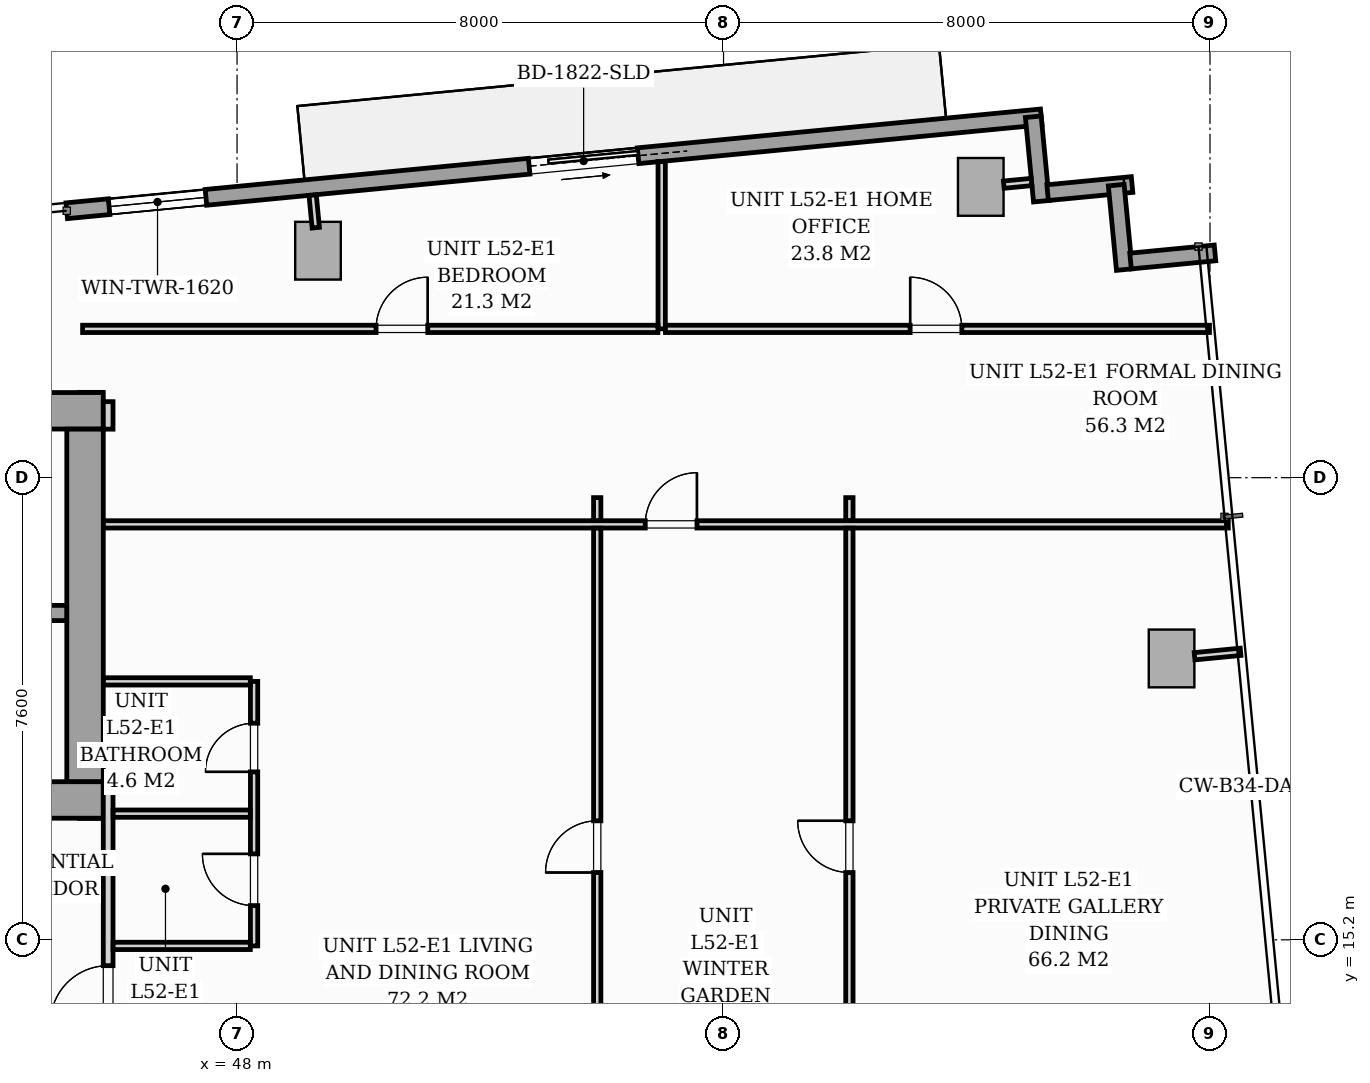
"""IFC4 building model, lengths in metres.
Left out: names, types, materials, properties, quantities, classifications, styles, units other than length and angle.
Written with IfcOpenShell. Run it as: python <this file> out.ifc"""

import sys

from ifc_helpers import new_model, si_unit, direction, frame, frame_2d, origin, origin_2d, place, context, subcontext, project, spatial, rectangle, i_section, extrude, source, transform, mapped, element, fill, save


model = new_model("IFC4")
c1 = context("Model", 3, precision=1e-05, world=origin(), true_north=direction((0.0, 1.0)))
c2 = subcontext(c1, "Body", "Model", "MODEL_VIEW")
j1 = project(units=[si_unit("LENGTHUNIT", "METRE"), si_unit("PLANEANGLEUNIT", "RADIAN")], contexts=[c1])
p1 = place(None, origin())
s1 = spatial("IfcSite", under=j1, at=p1, CompositionType="ELEMENT")
p2 = place(p1, origin())
s2 = spatial("IfcBuilding", under=s1, at=p2, CompositionType="ELEMENT")
p3 = place(p2, frame((0.0, 0.0, 182.6)))
s3 = spatial("IfcBuildingStorey", under=s2, at=p3, CompositionType="ELEMENT", Elevation=182.6)
m1 = source(origin(), c2, "Body", "SweptSolid", [
    extrude(i_section(OverallWidth=0.416, OverallDepth=0.446, WebThickness=0.039, FlangeThickness=0.063, FilletRadius=0.018, at=origin_2d()), origin(), (0.0, 0.0, 1.0), 3.196),
])
for number, where, z_axis, x_axis in (
    (1, (45.6, 17.4, 0.002), (0.0, 0.0, 1.0), (1.0, 0.0, 0.0)),
    (2, (45.6, 24.0, 0.002), (0.0, 0.0, 1.0), (1.0, 0.0, 0.0)),
):
    element("IfcColumn", number, at=place(p3, frame(where, z_axis=z_axis, x_axis=x_axis)), inside=s3, PredefinedType="PILASTER", context=c2, shape_type="MappedRepresentation", body=[
        mapped(m1, transform((0.0, 0.0, 0.0), scale=1.0)),
    ])
m2 = source(origin(), c2, "Body", "SweptSolid", [
    extrude(rectangle(XDim=0.75, YDim=0.95, at=origin_2d()), origin(), (0.0, 0.0, 1.0), 3.196),
])
for number, where, z_axis, x_axis in (
    (3, (49.331, 26.533, 0.002), (0.0, 0.0, 1.0), (0.995, 0.096, 0.0)),
    (4, (60.23, 27.582, 0.002), (0.0, 0.0, 1.0), (0.995, 0.096, 0.0)),
    (5, (63.368, 19.827, 0.002), (0.0, 0.0, 1.0), (0.995, 0.096, 0.0)),
):
    element("IfcColumn", number, at=place(p3, frame(where, z_axis=z_axis, x_axis=x_axis)), inside=s3, PredefinedType="COLUMN", context=c2, shape_type="MappedRepresentation", body=[
        mapped(m2, transform((0.0, 0.0, 0.0), scale=1.0)),
    ])
p4 = place(p3, frame((45.199, 27.19, 0.0), z_axis=(0.0, 0.0, 1.0), x_axis=(0.995397074604, 0.095836652014, 0.0)))
e6 = element("IfcWall", 6, at=p4, inside=s3, PredefinedType="STANDARD", context=c2, shape_type="SweptSolid", body=[
    extrude(rectangle(XDim=16.1, YDim=0.26, at=frame_2d((8.05, 0.0))), origin(), (0.0, 0.0, 1.0), 2.94),
])
p5 = place(p4, frame((7.64, 0.0, 0.0)))
e7 = element("IfcOpeningElement", 7, at=p5, cuts=e6, PredefinedType="OPENING", context=c2, shape_type="SweptSolid", body=[
    extrude(rectangle(XDim=1.8, YDim=2.06, at=frame_2d((0.9, 1.03))), frame((0.0, 0.14, 0.0), z_axis=(0.0, -1.0, 0.0), x_axis=(1.0, 0.0, 0.0)), (0.0, 0.0, 1.0), 0.28),
])
p6 = place(p4, frame((0.7, 0.0, 0.65)))
e8 = element("IfcOpeningElement", 8, at=p6, cuts=e6, PredefinedType="OPENING", context=c2, shape_type="SweptSolid", body=[
    extrude(rectangle(XDim=1.6, YDim=1.5, at=frame_2d((0.8, 0.75))), frame((0.0, 0.14, 0.0), z_axis=(0.0, -1.0, 0.0), x_axis=(1.0, 0.0, 0.0)), (0.0, 0.0, 1.0), 0.28),
])
p7 = place(p3, frame((61.094, 28.735, 0.0), z_axis=(0.0, 0.0, 1.0), x_axis=(0.095742423056, -0.99540614245, 0.0)))
e9 = element("IfcWall", 9, at=p7, inside=s3, PredefinedType="STANDARD", context=c2, shape_type="SweptSolid", body=[
    extrude(rectangle(XDim=1.395, YDim=0.26, at=frame_2d((0.697, 0.0))), origin(), (0.0, 0.0, 1.0), 2.94),
])
p8 = place(p3, frame((61.33, 27.487, 0.0), z_axis=(0.0, 0.0, 1.0), x_axis=(0.995391056452, 0.09589913835, 0.0)))
e10 = element("IfcWall", 10, at=p8, inside=s3, PredefinedType="STANDARD", context=c2, shape_type="SweptSolid", body=[
    extrude(rectangle(XDim=1.395, YDim=0.26, at=frame_2d((0.698, 0.0))), origin(), (0.0, 0.0, 1.0), 2.94),
])
for number, where, z_axis, x_axis in (
    (11, (62.458, 27.611, 0.0), (0.0, 0.0, 1.0), (0.096, -0.995, 0.0)),
    (12, (62.694, 26.363, 0.0), (0.0, 0.0, 1.0), (0.995, 0.096, 0.0)),
):
    element("IfcWall", number, at=place(p3, frame(where, z_axis=z_axis, x_axis=x_axis)), inside=s3, PredefinedType="STANDARD", context=c2, shape_type="SweptSolid", body=[
        extrude(rectangle(XDim=1.395, YDim=0.26, at=frame_2d((0.697, 0.0))), origin(), (0.0, 0.0, 1.0), 2.94),
    ])
p9 = place(p3, frame((26.2, 17.5, 0.0), z_axis=(0.0, 0.0, 1.0), x_axis=(1.0, 0.0, 0.0)))
e13 = element("IfcWall", 13, at=p9, inside=s3, PredefinedType="SHEAR", context=c2, shape_type="SweptSolid", body=[
    extrude(rectangle(XDim=19.6, YDim=0.6, at=frame_2d((9.8, 0.0))), origin(), (0.0, 0.0, 1.0), 3.2),
])
p10 = place(p9, frame((0.95, 0.0, 0.0)))
e14 = element("IfcOpeningElement", 14, at=p10, cuts=e13, PredefinedType="OPENING", context=c2, shape_type="SweptSolid", body=[
    extrude(rectangle(XDim=0.95, YDim=2.06, at=frame_2d((0.475, 1.03))), frame((0.0, 0.31, 0.0), z_axis=(0.0, -1.0, 0.0), x_axis=(1.0, 0.0, 0.0)), (0.0, 0.0, 1.0), 0.62),
])
p11 = place(p9, frame((9.38, 0.0, 0.0)))
e15 = element("IfcOpeningElement", 15, at=p11, cuts=e13, PredefinedType="OPENING", context=c2, shape_type="SweptSolid", body=[
    extrude(rectangle(XDim=0.85, YDim=2.0, at=frame_2d((0.425, 1.0))), frame((0.0, 0.31, 0.0), z_axis=(0.0, -1.0, 0.0), x_axis=(1.0, 0.0, 0.0)), (0.0, 0.0, 1.0), 0.62),
])
p12 = place(p9, frame((17.55, 0.0, 0.0)))
e16 = element("IfcOpeningElement", 16, at=p12, cuts=e13, PredefinedType="OPENING", context=c2, shape_type="SweptSolid", body=[
    extrude(rectangle(XDim=0.95, YDim=2.06, at=frame_2d((0.475, 1.03))), frame((0.0, 0.31, 0.0), z_axis=(0.0, -1.0, 0.0), x_axis=(1.0, 0.0, 0.0)), (0.0, 0.0, 1.0), 0.62),
])
p13 = place(p3, frame((26.2, 23.9, 0.0), z_axis=(0.0, 0.0, 1.0), x_axis=(1.0, 0.0, 0.0)))
e17 = element("IfcWall", 17, at=p13, inside=s3, PredefinedType="SHEAR", context=c2, shape_type="SweptSolid", body=[
    extrude(rectangle(XDim=19.6, YDim=0.6, at=frame_2d((9.8, 0.0))), origin(), (0.0, 0.0, 1.0), 3.2),
])
p14 = place(p3, frame((45.5, 17.802, 0.0), z_axis=(0.0, 0.0, 1.0), x_axis=(0.0, 1.0, 0.0)))
e18 = element("IfcWall", 18, at=p14, inside=s3, PredefinedType="SHEAR", context=c2, shape_type="SweptSolid", body=[
    extrude(rectangle(XDim=5.796, YDim=0.6, at=frame_2d((2.898, 0.0))), origin(), (0.0, 0.0, 1.0), 3.2),
])
p15 = place(p3, frame((37.05, 20.575, 0.0), z_axis=(0.0, 0.0, 1.0), x_axis=(1.0, 0.0, 0.0)))
e19 = element("IfcWall", 19, at=p15, inside=s3, PredefinedType="SOLIDWALL", context=c2, shape_type="SweptSolid", body=[
    extrude(rectangle(XDim=8.148, YDim=0.25, at=frame_2d((4.074, 0.0))), origin(), (0.0, 0.0, 1.0), 3.2),
])
p16 = place(p15, frame((6.6, 0.0, 0.0)))
e20 = element("IfcOpeningElement", 20, at=p16, cuts=e19, PredefinedType="OPENING", context=c2, shape_type="SweptSolid", body=[
    extrude(rectangle(XDim=0.95, YDim=2.06, at=frame_2d((0.475, 1.03))), frame((0.0, 0.135, 0.0), z_axis=(0.0, -1.0, 0.0), x_axis=(1.0, 0.0, 0.0)), (0.0, 0.0, 1.0), 0.27),
])
p17 = place(p3, frame((45.88, 13.332, 0.0), z_axis=(0.0, 0.0, 1.0), x_axis=(0.0, 1.0, 0.0)))
e21 = element("IfcWall", 21, at=p17, inside=s3, PredefinedType="PARTITIONING", context=c2, shape_type="SweptSolid", body=[
    extrude(rectangle(XDim=4.47, YDim=0.16, at=frame_2d((2.235, 0.0))), origin(), (0.0, 0.0, 1.0), 2.94),
])
p18 = place(p17, frame((0.493, 0.0, 0.0)))
e22 = element("IfcOpeningElement", 22, at=p18, cuts=e21, PredefinedType="OPENING", context=c2, shape_type="SweptSolid", body=[
    extrude(rectangle(XDim=0.95, YDim=2.06, at=frame_2d((0.475, 1.03))), frame((0.0, 0.09, 0.0), z_axis=(0.0, -1.0, 0.0), x_axis=(1.0, 0.0, 0.0)), (0.0, 0.0, 1.0), 0.18),
])
p19 = place(p3, frame((45.88, 23.598, 0.0), z_axis=(0.0, 0.0, 1.0), x_axis=(0.0, 1.0, 0.0)))
e23 = element("IfcWall", 23, at=p19, inside=s3, PredefinedType="PARTITIONING", context=c2, shape_type="SweptSolid", body=[
    extrude(rectangle(XDim=0.452, YDim=0.16, at=frame_2d((0.226, 0.0))), origin(), (0.0, 0.0, 1.0), 2.94),
])
p20 = place(p3, frame((48.28, 15.1, 0.0), z_axis=(0.0, 0.0, 1.0), x_axis=(0.0, 1.0, 0.0)))
e24 = element("IfcWall", 24, at=p20, inside=s3, PredefinedType="PARTITIONING", context=c2, shape_type="SweptSolid", body=[
    extrude(rectangle(XDim=4.35, YDim=0.12, at=frame_2d((2.175, 0.0))), origin(), (0.0, 0.0, 1.0), 2.94),
])
p21 = place(p20, frame((0.663, 0.0, 0.0)))
e25 = element("IfcOpeningElement", 25, at=p21, cuts=e24, PredefinedType="OPENING", context=c2, shape_type="SweptSolid", body=[
    extrude(rectangle(XDim=0.85, YDim=2.05, at=frame_2d((0.425, 1.025))), frame((0.0, 0.07, 0.0), z_axis=(0.0, -1.0, 0.0), x_axis=(1.0, 0.0, 0.0)), (0.0, 0.0, 1.0), 0.14),
])
p22 = place(p20, frame((2.862, 0.0, 0.0)))
e26 = element("IfcOpeningElement", 26, at=p22, cuts=e24, PredefinedType="OPENING", context=c2, shape_type="SweptSolid", body=[
    extrude(rectangle(XDim=0.8, YDim=2.02, at=frame_2d((0.4, 1.01))), frame((0.0, 0.07, 0.0), z_axis=(0.0, -1.0, 0.0), x_axis=(1.0, 0.0, 0.0)), (0.0, 0.0, 1.0), 0.14),
])
for number, where, z_axis, x_axis in (
    (27, (45.962, 17.275, 0.0), (0.0, 0.0, 1.0), (1.0, 0.0, 0.0)),
    (28, (45.962, 15.1, 0.0), (0.0, 0.0, 1.0), (1.0, 0.0, 0.0)),
):
    element("IfcWall", number, at=place(p3, frame(where, z_axis=z_axis, x_axis=x_axis)), inside=s3, PredefinedType="PARTITIONING", context=c2, shape_type="SweptSolid", body=[
        extrude(rectangle(XDim=2.256, YDim=0.12, at=frame_2d((1.128, 0.0))), origin(), (0.0, 0.0, 1.0), 2.94),
    ])
p23 = place(p3, frame((45.802, 19.45, 0.0), z_axis=(0.0, 0.0, 1.0), x_axis=(1.0, 0.0, 0.0)))
e29 = element("IfcWall", 29, at=p23, inside=s3, PredefinedType="PARTITIONING", context=c2, shape_type="SweptSolid", body=[
    extrude(rectangle(XDim=2.416, YDim=0.12, at=frame_2d((1.208, 0.0))), origin(), (0.0, 0.0, 1.0), 2.94),
])
p24 = place(p3, frame((54.983, 25.247, 0.0), z_axis=(0.0, 0.0, 1.0), x_axis=(0.0, 1.0, 0.0)))
e30 = element("IfcWall", 30, at=p24, inside=s3, PredefinedType="PARTITIONING", context=c2, shape_type="SweptSolid", body=[
    extrude(rectangle(XDim=2.752, YDim=0.12, at=frame_2d((1.376, 0.0))), origin(), (0.0, 0.0, 1.0), 2.94),
])
p25 = place(p3, frame((45.46, 25.247, 0.0), z_axis=(0.0, 0.0, 1.0), x_axis=(1.0, 0.0, 0.0)))
e31 = element("IfcWall", 31, at=p25, inside=s3, PredefinedType="PARTITIONING", context=c2, shape_type="SweptSolid", body=[
    extrude(rectangle(XDim=9.461, YDim=0.12, at=frame_2d((4.73, 0.0))), origin(), (0.0, 0.0, 1.0), 2.94),
])
p26 = place(p25, frame((4.826, 0.0, 0.0)))
e32 = element("IfcOpeningElement", 32, at=p26, cuts=e31, PredefinedType="OPENING", context=c2, shape_type="SweptSolid", body=[
    extrude(rectangle(XDim=0.85, YDim=2.05, at=frame_2d((0.425, 1.025))), frame((0.0, 0.07, 0.0), z_axis=(0.0, -1.0, 0.0), x_axis=(1.0, 0.0, 0.0)), (0.0, 0.0, 1.0), 0.14),
])
p27 = place(p3, frame((55.045, 25.247, 0.0), z_axis=(0.0, 0.0, 1.0), x_axis=(1.0, 0.0, 0.0)))
e33 = element("IfcWall", 33, at=p27, inside=s3, PredefinedType="PARTITIONING", context=c2, shape_type="SweptSolid", body=[
    extrude(rectangle(XDim=8.947, YDim=0.12, at=frame_2d((4.473, 0.0))), origin(), (0.0, 0.0, 1.0), 2.94),
])
p28 = place(p27, frame((4.024, 0.0, 0.0)))
e34 = element("IfcOpeningElement", 34, at=p28, cuts=e33, PredefinedType="OPENING", context=c2, shape_type="SweptSolid", body=[
    extrude(rectangle(XDim=0.85, YDim=2.05, at=frame_2d((0.425, 1.025))), frame((0.0, 0.07, 0.0), z_axis=(0.0, -1.0, 0.0), x_axis=(1.0, 0.0, 0.0)), (0.0, 0.0, 1.0), 0.14),
])
p29 = place(p3, frame((45.802, 22.032, 0.0), z_axis=(0.0, 0.0, 1.0), x_axis=(1.0, 0.0, 0.0)))
e35 = element("IfcWall", 35, at=p29, inside=s3, PredefinedType="PARTITIONING", context=c2, shape_type="SweptSolid", body=[
    extrude(rectangle(XDim=18.499, YDim=0.12, at=frame_2d((9.25, 0.0))), origin(), (0.0, 0.0, 1.0), 2.94),
])
p30 = place(p29, frame((8.911, 0.0, 0.0)))
e36 = element("IfcOpeningElement", 36, at=p30, cuts=e35, PredefinedType="OPENING", context=c2, shape_type="SweptSolid", body=[
    extrude(rectangle(XDim=0.85, YDim=2.05, at=frame_2d((0.425, 1.025))), frame((0.0, 0.07, 0.0), z_axis=(0.0, -1.0, 0.0), x_axis=(1.0, 0.0, 0.0)), (0.0, 0.0, 1.0), 0.14),
])
p31 = place(p3, frame((58.07, 11.495, 0.0), z_axis=(0.0, 0.0, 1.0), x_axis=(0.0, 1.0, 0.0)))
e37 = element("IfcWall", 37, at=p31, inside=s3, PredefinedType="PARTITIONING", context=c2, shape_type="SweptSolid", body=[
    extrude(rectangle(XDim=10.475, YDim=0.12, at=frame_2d((5.237, 0.0))), origin(), (0.0, 0.0, 1.0), 2.94),
])
p32 = place(p31, frame((4.812, 0.0, 0.0)))
e38 = element("IfcOpeningElement", 38, at=p32, cuts=e37, PredefinedType="OPENING", context=c2, shape_type="SweptSolid", body=[
    extrude(rectangle(XDim=0.85, YDim=2.05, at=frame_2d((0.425, 1.025))), frame((0.0, 0.07, 0.0), z_axis=(0.0, -1.0, 0.0), x_axis=(1.0, 0.0, 0.0)), (0.0, 0.0, 1.0), 0.14),
])
p33 = place(p3, frame((58.07, 22.094, 0.0), z_axis=(0.0, 0.0, 1.0), x_axis=(0.0, 1.0, 0.0)))
e39 = element("IfcWall", 39, at=p33, inside=s3, PredefinedType="PARTITIONING", context=c2, shape_type="SweptSolid", body=[
    extrude(rectangle(XDim=0.378, YDim=0.12, at=frame_2d((0.189, 0.0))), origin(), (0.0, 0.0, 1.0), 2.94),
])
p34 = place(p3, frame((53.923, 11.495, 0.0), z_axis=(0.0, 0.0, 1.0), x_axis=(0.0, 1.0, 0.0)))
e40 = element("IfcWall", 40, at=p34, inside=s3, PredefinedType="PARTITIONING", context=c2, shape_type="SweptSolid", body=[
    extrude(rectangle(XDim=10.475, YDim=0.12, at=frame_2d((5.237, 0.0))), origin(), (0.0, 0.0, 1.0), 2.94),
])
p35 = place(p34, frame((4.812, 0.0, 0.0)))
e41 = element("IfcOpeningElement", 41, at=p35, cuts=e40, PredefinedType="OPENING", context=c2, shape_type="SweptSolid", body=[
    extrude(rectangle(XDim=0.85, YDim=2.05, at=frame_2d((0.425, 1.025))), frame((0.0, 0.07, 0.0), z_axis=(0.0, -1.0, 0.0), x_axis=(1.0, 0.0, 0.0)), (0.0, 0.0, 1.0), 0.14),
])
p36 = place(p3, frame((53.923, 22.094, 0.0), z_axis=(0.0, 0.0, 1.0), x_axis=(0.0, 1.0, 0.0)))
e42 = element("IfcWall", 42, at=p36, inside=s3, PredefinedType="PARTITIONING", context=c2, shape_type="SweptSolid", body=[
    extrude(rectangle(XDim=0.378, YDim=0.12, at=frame_2d((0.189, 0.0))), origin(), (0.0, 0.0, 1.0), 2.94),
])
p37 = place(p3, frame((49.294, 26.911, 0.0), z_axis=(0.0, 0.0, 1.0), x_axis=(-0.095772948675, 0.995403205893, 0.0)))
e43 = element("IfcWall", 43, at=p37, inside=s3, PredefinedType="PARTITIONING", context=c2, shape_type="SweptSolid", body=[
    extrude(rectangle(XDim=0.538, YDim=0.12, at=frame_2d((0.269, 0.0))), origin(), (0.0, 0.0, 1.0), 2.94),
])
p38 = place(p3, frame((60.609, 27.618, 0.0), z_axis=(0.0, 0.0, 1.0), x_axis=(0.995384576284, 0.09596637586, 0.0)))
e44 = element("IfcWall", 44, at=p38, inside=s3, PredefinedType="PARTITIONING", context=c2, shape_type="SweptSolid", body=[
    extrude(rectangle(XDim=0.458, YDim=0.12, at=frame_2d((0.229, 0.0))), origin(), (0.0, 0.0, 1.0), 2.94),
])
p39 = place(p3, frame((63.747, 19.864, 0.0), z_axis=(0.0, 0.0, 1.0), x_axis=(0.995405496295, 0.095749140702, 0.0)))
e45 = element("IfcWall", 45, at=p39, inside=s3, PredefinedType="PARTITIONING", context=c2, shape_type="SweptSolid", body=[
    extrude(rectangle(XDim=0.76, YDim=0.12, at=frame_2d((0.38, 0.0))), origin(), (0.0, 0.0, 1.0), 2.94),
])
m3 = source(origin(), c2, "Body", "SweptSolid", [
    extrude(rectangle(XDim=1.8, YDim=2.06, at=frame_2d((0.9, 1.03))), frame((0.0, 0.025, 0.0), z_axis=(0.0, -1.0, 0.0), x_axis=(1.0, 0.0, 0.0)), (0.0, 0.0, 1.0), 0.05),
])
p40 = place(p5, origin())
e46 = element("IfcDoor", 46, at=p40, inside=s3, OperationType="SLIDING_TO_RIGHT", PredefinedType="DOOR", context=c2, shape_type="MappedRepresentation", body=[
    mapped(m3, transform((0.0, 0.0, 0.0), scale=1.0)),
])
fill(e7, e46)
m4 = source(origin(), c2, "Body", "SweptSolid", [
    extrude(rectangle(XDim=1.6, YDim=1.5, at=frame_2d((0.8, 0.75))), frame((0.0, 0.03, 0.0), z_axis=(0.0, -1.0, 0.0), x_axis=(1.0, 0.0, 0.0)), (0.0, 0.0, 1.0), 0.06),
])
p41 = place(p6, origin())
e47 = element("IfcWindow", 47, at=p41, inside=s3, PartitioningType="SINGLE_PANEL", PredefinedType="WINDOW", context=c2, shape_type="MappedRepresentation", body=[
    mapped(m4, transform((0.0, 0.0, 0.0), scale=1.0)),
])
fill(e8, e47)
m5 = source(origin(), c2, "Body", "SweptSolid", [
    extrude(rectangle(XDim=0.95, YDim=2.06, at=frame_2d((0.475, 1.03))), frame((0.0, 0.025, 0.0), z_axis=(0.0, -1.0, 0.0), x_axis=(1.0, 0.0, 0.0)), (0.0, 0.0, 1.0), 0.05),
])
p42 = place(p18, origin())
e48 = element("IfcDoor", 48, at=p42, inside=s3, OperationType="SINGLE_SWING_LEFT", PredefinedType="DOOR", context=c2, shape_type="MappedRepresentation", body=[
    mapped(m5, transform((0.0, 0.0, 0.0), scale=1.0)),
])
fill(e22, e48)
m6 = source(origin(), c2, "Body", "SweptSolid", [
    extrude(rectangle(XDim=0.85, YDim=2.05, at=frame_2d((0.425, 1.025))), frame((0.0, 0.025, 0.0), z_axis=(0.0, -1.0, 0.0), x_axis=(1.0, 0.0, 0.0)), (0.0, 0.0, 1.0), 0.05),
])
p43 = place(p21, origin())
e49 = element("IfcDoor", 49, at=p43, inside=s3, OperationType="SINGLE_SWING_RIGHT", PredefinedType="DOOR", context=c2, shape_type="MappedRepresentation", body=[
    mapped(m6, transform((0.0, 0.0, 0.0), scale=1.0)),
])
fill(e25, e49)
m7 = source(origin(), c2, "Body", "SweptSolid", [
    extrude(rectangle(XDim=0.8, YDim=2.02, at=frame_2d((0.4, 1.01))), frame((0.0, 0.025, 0.0), z_axis=(0.0, -1.0, 0.0), x_axis=(1.0, 0.0, 0.0)), (0.0, 0.0, 1.0), 0.05),
])
p44 = place(p22, origin())
e50 = element("IfcDoor", 50, at=p44, inside=s3, OperationType="SINGLE_SWING_LEFT", PredefinedType="DOOR", context=c2, shape_type="MappedRepresentation", body=[
    mapped(m7, transform((0.0, 0.0, 0.0), scale=1.0)),
])
fill(e26, e50)
p45 = place(p26, origin())
e51 = element("IfcDoor", 51, at=p45, inside=s3, OperationType="SINGLE_SWING_RIGHT", PredefinedType="DOOR", context=c2, shape_type="MappedRepresentation", body=[
    mapped(m6, transform((0.0, 0.0, 0.0), scale=1.0)),
])
fill(e32, e51)
p46 = place(p28, origin())
e52 = element("IfcDoor", 52, at=p46, inside=s3, OperationType="SINGLE_SWING_LEFT", PredefinedType="DOOR", context=c2, shape_type="MappedRepresentation", body=[
    mapped(m6, transform((0.0, 0.0, 0.0), scale=1.0)),
])
fill(e34, e52)
p47 = place(p30, origin())
e53 = element("IfcDoor", 53, at=p47, inside=s3, OperationType="SINGLE_SWING_RIGHT", PredefinedType="DOOR", context=c2, shape_type="MappedRepresentation", body=[
    mapped(m6, transform((0.0, 0.0, 0.0), scale=1.0)),
])
fill(e36, e53)
p48 = place(p32, origin())
e54 = element("IfcDoor", 54, at=p48, inside=s3, OperationType="SINGLE_SWING_RIGHT", PredefinedType="DOOR", context=c2, shape_type="MappedRepresentation", body=[
    mapped(m6, transform((0.0, 0.0, 0.0), scale=1.0)),
])
fill(e38, e54)
p49 = place(p35, origin())
e55 = element("IfcDoor", 55, at=p49, inside=s3, OperationType="SINGLE_SWING_LEFT", PredefinedType="DOOR", context=c2, shape_type="MappedRepresentation", body=[
    mapped(m6, transform((0.0, 0.0, 0.0), scale=1.0)),
])
fill(e41, e55)
save(model, sys.argv[1])
